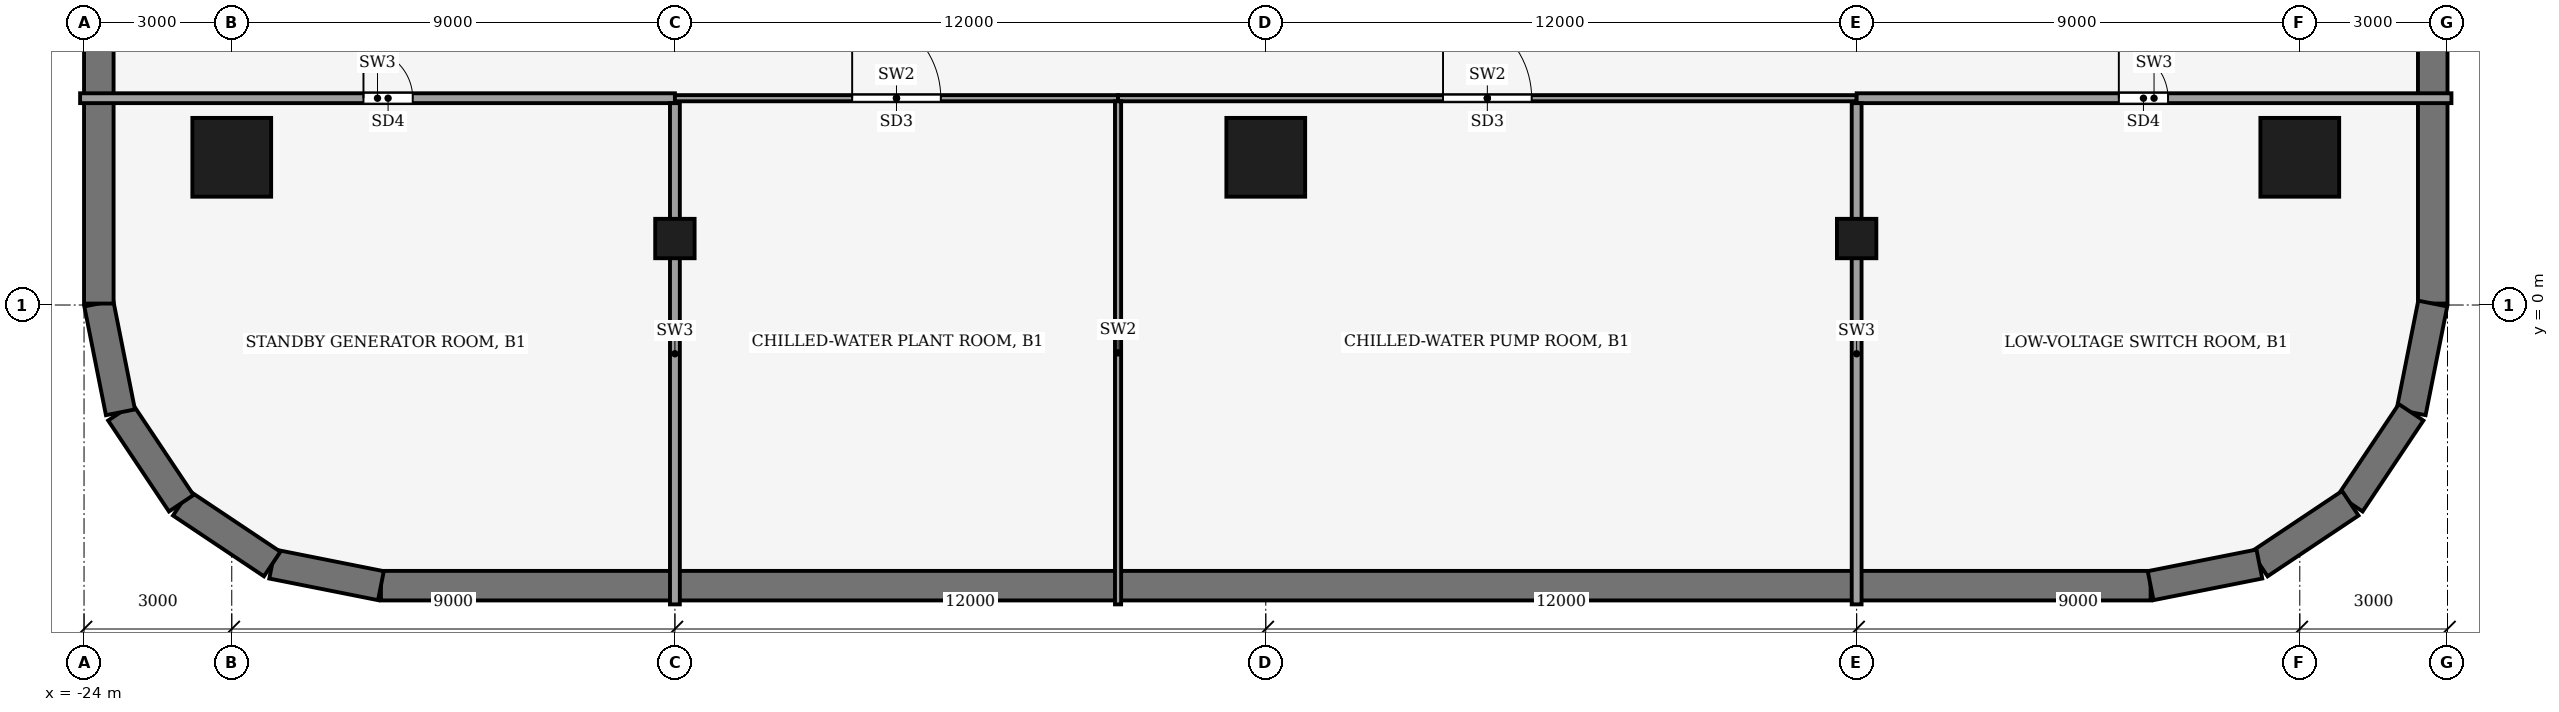
"""IFC4 building model, lengths in metres.
Left out: names, types, materials, properties, quantities, classifications, styles, units other than length and angle.
Written with IfcOpenShell. Run it as: python <this file> out.ifc"""

import sys

from ifc_helpers import new_model, si_unit, direction, frame, frame_2d, origin, origin_2d, place, context, subcontext, project, spatial, rectangle, hollow_rectangle, extrude, element, fill, save


model = new_model("IFC4")
c1 = context("Model", 3, precision=1e-05, world=origin(), true_north=direction((0.0, 1.0)))
c2 = subcontext(c1, "Body", "Model", "MODEL_VIEW")
j1 = project(units=[si_unit("LENGTHUNIT", "METRE"), si_unit("PLANEANGLEUNIT", "RADIAN")], contexts=[c1])
p1 = place(None, origin())
s1 = spatial("IfcSite", under=j1, at=p1, CompositionType="ELEMENT")
p2 = place(p1, origin())
s2 = spatial("IfcBuilding", under=s1, at=p2, CompositionType="ELEMENT")
p3 = place(p2, frame((0.0, 0.0, -6.0)))
s3 = spatial("IfcBuildingStorey", under=s2, at=p3, CompositionType="ELEMENT", Elevation=-6.0)
p4 = place(p3, frame((17.97, -5.7, 0.0), z_axis=(0.0, 0.0, 1.0), x_axis=(-1.0, 0.0, 0.0)))
e1 = element("IfcWall", 1, at=p4, inside=s3, PredefinedType="SHEAR", context=c2, shape_type="SweptSolid", body=[
    extrude(rectangle(XDim=35.941, YDim=0.6, at=frame_2d((17.97, 0.0))), origin(), (0.0, 0.0, 1.0), 5.55),
])
p5 = place(p3, frame((-17.97, -5.7, 0.0), z_axis=(0.0, 0.0, 1.0), x_axis=(-0.980792774628, 0.195052642224, 0.0)))
e2 = element("IfcWall", 2, at=p5, inside=s3, PredefinedType="SHEAR", context=c2, shape_type="SweptSolid", body=[
    extrude(rectangle(XDim=2.252, YDim=0.6, at=frame_2d((1.126, 0.0))), origin(), (0.0, 0.0, 1.0), 5.55),
])
for number, where, z_axis, x_axis in (
    (3, (-20.179, -5.261, 0.0), (0.0, 0.0, 1.0), (-0.831, 0.556, 0.0)),
    (4, (-22.026, -4.026, 0.0), (0.0, 0.0, 1.0), (-0.556, 0.831, 0.0)),
):
    element("IfcWall", number, at=place(p3, frame(where, z_axis=z_axis, x_axis=x_axis)), inside=s3, PredefinedType="SHEAR", context=c2, shape_type="SweptSolid", body=[
        extrude(rectangle(XDim=2.222, YDim=0.6, at=frame_2d((1.111, 0.0))), origin(), (0.0, 0.0, 1.0), 5.55),
    ])
p6 = place(p3, frame((-23.261, -2.179, 0.0), z_axis=(0.0, 0.0, 1.0), x_axis=(-0.195052642224, 0.980792774628, 0.0)))
e5 = element("IfcWall", 5, at=p6, inside=s3, PredefinedType="SHEAR", context=c2, shape_type="SweptSolid", body=[
    extrude(rectangle(XDim=2.252, YDim=0.6, at=frame_2d((1.126, 0.0))), origin(), (0.0, 0.0, 1.0), 5.55),
])
for number, where, z_axis, x_axis in (
    (6, (-23.7, 0.03, 0.0), (0.0, 0.0, 1.0), (0.0, 1.0, 0.0)),
    (7, (23.7, 38.97, 0.0), (0.0, 0.0, 1.0), (0.0, -1.0, 0.0)),
):
    element("IfcWall", number, at=place(p3, frame(where, z_axis=z_axis, x_axis=x_axis)), inside=s3, PredefinedType="SHEAR", context=c2, shape_type="SweptSolid", body=[
        extrude(rectangle(XDim=38.941, YDim=0.6, at=frame_2d((19.47, 0.0))), origin(), (0.0, 0.0, 1.0), 5.55),
    ])
p7 = place(p3, frame((23.7, 0.03, 0.0), z_axis=(0.0, 0.0, 1.0), x_axis=(-0.195052642224, -0.980792774628, 0.0)))
e8 = element("IfcWall", 8, at=p7, inside=s3, PredefinedType="SHEAR", context=c2, shape_type="SweptSolid", body=[
    extrude(rectangle(XDim=2.252, YDim=0.6, at=frame_2d((1.126, 0.0))), origin(), (0.0, 0.0, 1.0), 5.55),
])
for number, where, z_axis, x_axis in (
    (9, (23.261, -2.179, 0.0), (0.0, 0.0, 1.0), (-0.556, -0.831, 0.0)),
    (10, (22.026, -4.026, 0.0), (0.0, 0.0, 1.0), (-0.831, -0.556, 0.0)),
):
    element("IfcWall", number, at=place(p3, frame(where, z_axis=z_axis, x_axis=x_axis)), inside=s3, PredefinedType="SHEAR", context=c2, shape_type="SweptSolid", body=[
        extrude(rectangle(XDim=2.222, YDim=0.6, at=frame_2d((1.111, 0.0))), origin(), (0.0, 0.0, 1.0), 5.55),
    ])
p8 = place(p3, frame((20.179, -5.261, 0.0), z_axis=(0.0, 0.0, 1.0), x_axis=(-0.980792774628, -0.195052642224, 0.0)))
e11 = element("IfcWall", 11, at=p8, inside=s3, PredefinedType="SHEAR", context=c2, shape_type="SweptSolid", body=[
    extrude(rectangle(XDim=2.252, YDim=0.6, at=frame_2d((1.126, 0.0))), origin(), (0.0, 0.0, 1.0), 5.55),
])
for number, where, z_axis, x_axis in (
    (12, (21.0, 3.0, 0.0), (0.0, 0.0, 1.0), (1.0, 0.0, 0.0)),
    (13, (0.0, 3.0, 0.0), (0.0, 0.0, 1.0), (1.0, 0.0, 0.0)),
    (14, (-21.0, 3.0, 0.0), (0.0, 0.0, 1.0), (1.0, 0.0, 0.0)),
):
    element("IfcColumn", number, at=place(p3, frame(where, z_axis=z_axis, x_axis=x_axis)), inside=s3, PredefinedType="COLUMN", context=c2, shape_type="SweptSolid", body=[
        extrude(hollow_rectangle(XDim=1.6, YDim=1.6, WallThickness=0.09, at=origin_2d()), origin(), (0.0, 0.0, 1.0), 6.0),
    ])
for number, where, z_axis, x_axis in (
    (15, (-12.0, 1.35, 0.0), (0.0, 0.0, 1.0), (1.0, 0.0, 0.0)),
    (16, (12.0, 1.35, 0.0), (0.0, 0.0, 1.0), (1.0, 0.0, 0.0)),
):
    element("IfcColumn", number, at=place(p3, frame(where, z_axis=z_axis, x_axis=x_axis)), inside=s3, PredefinedType="COLUMN", context=c2, shape_type="SweptSolid", body=[
        extrude(hollow_rectangle(XDim=0.8, YDim=0.8, WallThickness=0.04, at=origin_2d()), origin(), (0.0, 0.0, 1.0), 6.0),
    ])
p9 = place(p3, frame((-24.08, 4.2, 0.0), z_axis=(0.0, 0.0, 1.0), x_axis=(1.0, 0.0, 0.0)))
e17 = element("IfcWall", 17, at=p9, inside=s3, PredefinedType="PARTITIONING", context=c2, shape_type="SweptSolid", body=[
    extrude(rectangle(XDim=12.08, YDim=0.2, at=frame_2d((6.04, 0.0))), origin(), (0.0, 0.0, 1.0), 5.55),
])
p10 = place(p9, frame((5.755, 0.0, 0.0)))
e18 = element("IfcOpeningElement", 18, at=p10, cuts=e17, PredefinedType="OPENING", context=c2, shape_type="SweptSolid", body=[
    extrude(rectangle(XDim=1.0, YDim=2.1, at=frame_2d((0.5, 1.05))), frame((0.0, 0.11, 0.0), z_axis=(0.0, -1.0, 0.0), x_axis=(1.0, 0.0, 0.0)), (0.0, 0.0, 1.0), 0.22),
])
p11 = place(p3, frame((-12.0, 4.2, 0.0), z_axis=(0.0, 0.0, 1.0), x_axis=(1.0, 0.0, 0.0)))
e19 = element("IfcWall", 19, at=p11, inside=s3, PredefinedType="PARTITIONING", context=c2, shape_type="SweptSolid", body=[
    extrude(rectangle(XDim=9.0, YDim=0.125, at=frame_2d((4.5, 0.0))), origin(), (0.0, 0.0, 1.0), 5.55),
])
p12 = place(p11, frame((3.6, 0.0, 0.0)))
e20 = element("IfcOpeningElement", 20, at=p12, cuts=e19, PredefinedType="OPENING", context=c2, shape_type="SweptSolid", body=[
    extrude(rectangle(XDim=1.8, YDim=2.4, at=frame_2d((0.9, 1.2))), frame((0.0, 0.073, 0.0), z_axis=(0.0, -1.0, 0.0), x_axis=(1.0, 0.0, 0.0)), (0.0, 0.0, 1.0), 0.145),
])
p13 = place(p3, frame((-3.0, 4.2, 0.0), z_axis=(0.0, 0.0, 1.0), x_axis=(1.0, 0.0, 0.0)))
e21 = element("IfcWall", 21, at=p13, inside=s3, PredefinedType="PARTITIONING", context=c2, shape_type="SweptSolid", body=[
    extrude(rectangle(XDim=15.0, YDim=0.125, at=frame_2d((7.5, 0.0))), origin(), (0.0, 0.0, 1.0), 5.55),
])
p14 = place(p13, frame((6.6, 0.0, 0.0)))
e22 = element("IfcOpeningElement", 22, at=p14, cuts=e21, PredefinedType="OPENING", context=c2, shape_type="SweptSolid", body=[
    extrude(rectangle(XDim=1.8, YDim=2.4, at=frame_2d((0.9, 1.2))), frame((0.0, 0.073, 0.0), z_axis=(0.0, -1.0, 0.0), x_axis=(1.0, 0.0, 0.0)), (0.0, 0.0, 1.0), 0.145),
])
p15 = place(p3, frame((12.0, 4.2, 0.0), z_axis=(0.0, 0.0, 1.0), x_axis=(1.0, 0.0, 0.0)))
e23 = element("IfcWall", 23, at=p15, inside=s3, PredefinedType="PARTITIONING", context=c2, shape_type="SweptSolid", body=[
    extrude(rectangle(XDim=12.08, YDim=0.2, at=frame_2d((6.04, 0.0))), origin(), (0.0, 0.0, 1.0), 5.55),
])
p16 = place(p15, frame((5.325, 0.0, 0.0)))
e24 = element("IfcOpeningElement", 24, at=p16, cuts=e23, PredefinedType="OPENING", context=c2, shape_type="SweptSolid", body=[
    extrude(rectangle(XDim=1.0, YDim=2.1, at=frame_2d((0.5, 1.05))), frame((0.0, 0.11, 0.0), z_axis=(0.0, -1.0, 0.0), x_axis=(1.0, 0.0, 0.0)), (0.0, 0.0, 1.0), 0.22),
])
p17 = place(p3, frame((-12.0, 4.1, 0.0), z_axis=(0.0, 0.0, 1.0), x_axis=(0.0, -1.0, 0.0)))
e25 = element("IfcWall", 25, at=p17, inside=s3, PredefinedType="PARTITIONING", context=c2, shape_type="SweptSolid", body=[
    extrude(rectangle(XDim=10.18, YDim=0.2, at=frame_2d((5.09, 0.0))), origin(), (0.0, 0.0, 1.0), 5.55),
])
p18 = place(p3, frame((-3.0, 4.137, 0.0), z_axis=(0.0, 0.0, 1.0), x_axis=(0.0, -1.0, 0.0)))
e26 = element("IfcWall", 26, at=p18, inside=s3, PredefinedType="PARTITIONING", context=c2, shape_type="SweptSolid", body=[
    extrude(rectangle(XDim=10.218, YDim=0.125, at=frame_2d((5.109, 0.0))), origin(), (0.0, 0.0, 1.0), 5.55),
])
p19 = place(p3, frame((12.0, 4.1, 0.0), z_axis=(0.0, 0.0, 1.0), x_axis=(0.0, -1.0, 0.0)))
e27 = element("IfcWall", 27, at=p19, inside=s3, PredefinedType="PARTITIONING", context=c2, shape_type="SweptSolid", body=[
    extrude(rectangle(XDim=10.18, YDim=0.2, at=frame_2d((5.09, 0.0))), origin(), (0.0, 0.0, 1.0), 5.55),
])
p20 = place(p10, origin())
e28 = element("IfcDoor", 28, at=p20, inside=s3, OperationType="SINGLE_SWING_RIGHT", PredefinedType="DOOR", context=c2, shape_type="SweptSolid", body=[
    extrude(rectangle(XDim=1.0, YDim=2.1, at=frame_2d((0.5, 1.05))), frame((0.0, 0.025, 0.0), z_axis=(0.0, -1.0, 0.0), x_axis=(1.0, 0.0, 0.0)), (0.0, 0.0, 1.0), 0.05),
])
fill(e18, e28)
p21 = place(p12, origin())
e29 = element("IfcDoor", 29, at=p21, inside=s3, OperationType="DOUBLE_DOOR_SINGLE_SWING", PredefinedType="DOOR", context=c2, shape_type="SweptSolid", body=[
    extrude(rectangle(XDim=1.8, YDim=2.4, at=frame_2d((0.9, 1.2))), frame((0.0, 0.025, 0.0), z_axis=(0.0, -1.0, 0.0), x_axis=(1.0, 0.0, 0.0)), (0.0, 0.0, 1.0), 0.05),
])
fill(e20, e29)
p22 = place(p14, origin())
e30 = element("IfcDoor", 30, at=p22, inside=s3, OperationType="DOUBLE_DOOR_SINGLE_SWING", PredefinedType="DOOR", context=c2, shape_type="SweptSolid", body=[
    extrude(rectangle(XDim=1.8, YDim=2.4, at=frame_2d((0.9, 1.2))), frame((0.0, 0.025, 0.0), z_axis=(0.0, -1.0, 0.0), x_axis=(1.0, 0.0, 0.0)), (0.0, 0.0, 1.0), 0.05),
])
fill(e22, e30)
p23 = place(p16, origin())
e31 = element("IfcDoor", 31, at=p23, inside=s3, OperationType="SINGLE_SWING_LEFT", PredefinedType="DOOR", context=c2, shape_type="SweptSolid", body=[
    extrude(rectangle(XDim=1.0, YDim=2.1, at=frame_2d((0.5, 1.05))), frame((0.0, 0.025, 0.0), z_axis=(0.0, -1.0, 0.0), x_axis=(1.0, 0.0, 0.0)), (0.0, 0.0, 1.0), 0.05),
])
fill(e24, e31)
save(model, sys.argv[1])
